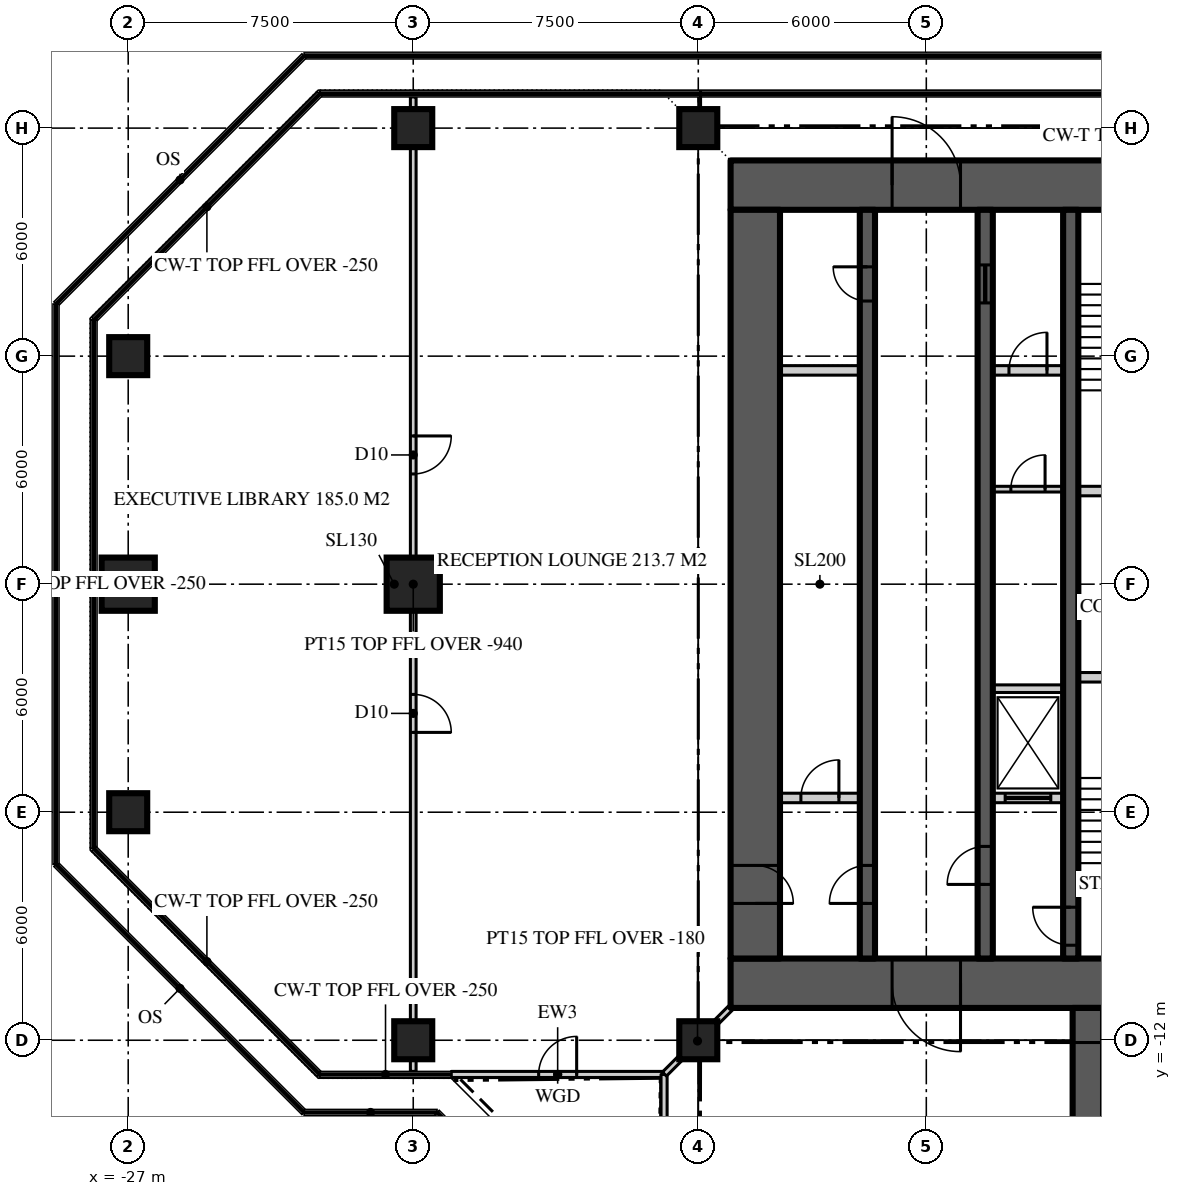
"""IFC4 building model, lengths in metres.
Left out: names, types, materials, properties, quantities, classifications, styles, units other than length and angle.
Written with IfcOpenShell. Run it as: python <this file> out.ifc"""

import sys

from ifc_helpers import new_model, si_unit, direction, frame, frame_2d, origin, origin_2d, place, context, subcontext, project, spatial, rectangle, extrude, element, fill, save


model = new_model("IFC4")
c1 = context("Model", 3, precision=1e-05, world=origin(), true_north=direction((0.0, 1.0)))
c2 = subcontext(c1, "Body", "Model", "MODEL_VIEW")
j1 = project(units=[si_unit("LENGTHUNIT", "METRE"), si_unit("PLANEANGLEUNIT", "RADIAN")], contexts=[c1])
p1 = place(None, origin())
s1 = spatial("IfcSite", under=j1, at=p1, CompositionType="ELEMENT")
p2 = place(p1, origin())
s2 = spatial("IfcBuilding", under=s1, at=p2, CompositionType="ELEMENT")
p3 = place(p2, frame((0.0, 0.0, 302.4)))
s3 = spatial("IfcBuildingStorey", under=s2, at=p3, CompositionType="ELEMENT", Elevation=302.4)
p4 = place(p3, frame((-11.15, 10.5, 0.0), z_axis=(0.0, 0.0, 1.0), x_axis=(1.0, 0.0, 0.0)))
e1 = element("IfcWall", 1, at=p4, inside=s3, PredefinedType="SHEAR", context=c2, shape_type="SweptSolid", body=[
    extrude(rectangle(XDim=22.3, YDim=1.3, at=frame_2d((11.15, 0.0))), origin(), (0.0, 0.0, 1.0), 3.9),
])
p5 = place(p4, frame((4.25, 0.0, 0.0)))
e2 = element("IfcOpeningElement", 2, at=p5, cuts=e1, PredefinedType="OPENING", context=c2, shape_type="SweptSolid", body=[
    extrude(rectangle(XDim=1.8, YDim=2.2, at=frame_2d((0.9, 1.1))), frame((0.0, 0.66, 0.0), z_axis=(0.0, -1.0, 0.0), x_axis=(1.0, 0.0, 0.0)), (0.0, 0.0, 1.0), 1.32),
])
p6 = place(p4, frame((16.25, 0.0, 0.0)))
e3 = element("IfcOpeningElement", 3, at=p6, cuts=e1, PredefinedType="OPENING", context=c2, shape_type="SweptSolid", body=[
    extrude(rectangle(XDim=1.8, YDim=2.2, at=frame_2d((0.9, 1.1))), frame((0.0, 0.66, 0.0), z_axis=(0.0, -1.0, 0.0), x_axis=(1.0, 0.0, 0.0)), (0.0, 0.0, 1.0), 1.32),
])
p7 = place(p3, frame((11.15, -10.5, 0.0), z_axis=(0.0, 0.0, 1.0), x_axis=(-1.0, 0.0, 0.0)))
e4 = element("IfcWall", 4, at=p7, inside=s3, PredefinedType="SHEAR", context=c2, shape_type="SweptSolid", body=[
    extrude(rectangle(XDim=22.3, YDim=1.3, at=frame_2d((11.15, 0.0))), origin(), (0.0, 0.0, 1.0), 3.9),
])
p8 = place(p7, frame((16.25, 0.0, 0.0)))
e5 = element("IfcOpeningElement", 5, at=p8, cuts=e4, PredefinedType="OPENING", context=c2, shape_type="SweptSolid", body=[
    extrude(rectangle(XDim=1.8, YDim=2.2, at=frame_2d((0.9, 1.1))), frame((0.0, 0.66, 0.0), z_axis=(0.0, -1.0, 0.0), x_axis=(1.0, 0.0, 0.0)), (0.0, 0.0, 1.0), 1.32),
])
p9 = place(p7, frame((4.25, 0.0, 0.0)))
e6 = element("IfcOpeningElement", 6, at=p9, cuts=e4, PredefinedType="OPENING", context=c2, shape_type="SweptSolid", body=[
    extrude(rectangle(XDim=1.8, YDim=2.2, at=frame_2d((0.9, 1.1))), frame((0.0, 0.66, 0.0), z_axis=(0.0, -1.0, 0.0), x_axis=(1.0, 0.0, 0.0)), (0.0, 0.0, 1.0), 1.32),
])
p10 = place(p3, frame((-10.5, 9.85, 0.0), z_axis=(0.0, 0.0, 1.0), x_axis=(0.0, -1.0, 0.0)))
e7 = element("IfcWall", 7, at=p10, inside=s3, PredefinedType="SHEAR", context=c2, shape_type="SweptSolid", body=[
    extrude(rectangle(XDim=19.7, YDim=1.3, at=frame_2d((9.85, 0.0))), origin(), (0.0, 0.0, 1.0), 3.9),
])
p11 = place(p10, frame((17.25, 0.0, 0.0)))
e8 = element("IfcOpeningElement", 8, at=p11, cuts=e7, PredefinedType="OPENING", context=c2, shape_type="SweptSolid", body=[
    extrude(rectangle(XDim=1.0, YDim=2.2, at=frame_2d((0.5, 1.1))), frame((0.0, 0.66, 0.0), z_axis=(0.0, -1.0, 0.0), x_axis=(1.0, 0.0, 0.0)), (0.0, 0.0, 1.0), 1.32),
])
p12 = place(p3, frame((-1.75, -11.15, 0.0), z_axis=(0.0, 0.0, 1.0), x_axis=(0.0, -1.0, 0.0)))
e9 = element("IfcWall", 9, at=p12, inside=s3, PredefinedType="SHEAR", context=c2, shape_type="SweptSolid", body=[
    extrude(rectangle(XDim=15.25, YDim=0.8, at=frame_2d((7.625, 0.0))), origin(), (0.0, 0.0, 1.0), 3.9),
])
for number, where, z_axis, x_axis in (
    (10, (-19.5, -12.0, 0.0), (0.0, 0.0, 1.0), (1.0, 0.0, 0.0)),
    (11, (-12.0, -12.0, 0.0), (0.0, 0.0, 1.0), (1.0, 0.0, 0.0)),
    (12, (-27.0, -6.0, 0.0), (0.0, 0.0, 1.0), (1.0, 0.0, 0.0)),
):
    element("IfcColumn", number, at=place(p3, frame(where, z_axis=z_axis, x_axis=x_axis)), inside=s3, PredefinedType="COLUMN", context=c2, shape_type="SweptSolid", body=[
        extrude(rectangle(XDim=1.0, YDim=1.0, at=origin_2d()), origin(), (0.0, 0.0, 1.0), 3.9),
    ])
for number, where, z_axis, x_axis in (
    (13, (-27.0, 0.0, 0.0), (0.0, 0.0, 1.0), (1.0, 0.0, 0.0)),
    (14, (-19.5, 0.0, 0.0), (0.0, 0.0, 1.0), (1.0, 0.0, 0.0)),
):
    element("IfcColumn", number, at=place(p3, frame(where, z_axis=z_axis, x_axis=x_axis)), inside=s3, PredefinedType="COLUMN", context=c2, shape_type="SweptSolid", body=[
        extrude(rectangle(XDim=1.4, YDim=1.4, at=origin_2d()), origin(), (0.0, 0.0, 1.0), 3.9),
    ])
for number, where, z_axis, x_axis in (
    (15, (-27.0, 6.0, 0.0), (0.0, 0.0, 1.0), (1.0, 0.0, 0.0)),
    (16, (-19.5, 12.0, 0.0), (0.0, 0.0, 1.0), (1.0, 0.0, 0.0)),
    (17, (-12.0, 12.0, 0.0), (0.0, 0.0, 1.0), (1.0, 0.0, 0.0)),
):
    element("IfcColumn", number, at=place(p3, frame(where, z_axis=z_axis, x_axis=x_axis)), inside=s3, PredefinedType="COLUMN", context=c2, shape_type="SweptSolid", body=[
        extrude(rectangle(XDim=1.0, YDim=1.0, at=origin_2d()), origin(), (0.0, 0.0, 1.0), 3.9),
    ])
p13 = place(p3, frame((-18.5, -12.9, 0.0), z_axis=(0.0, 0.0, 1.0), x_axis=(1.0, 0.0, 0.0)))
e18 = element("IfcWall", 18, at=p13, inside=s3, PredefinedType="SOLIDWALL", context=c2, shape_type="SweptSolid", body=[
    extrude(rectangle(XDim=5.6, YDim=0.16, at=frame_2d((2.8, 0.0))), origin(), (0.0, 0.0, 1.0), 3.65),
])
p14 = place(p13, frame((2.3, 0.0, 0.0)))
e19 = element("IfcOpeningElement", 19, at=p14, cuts=e18, PredefinedType="OPENING", context=c2, shape_type="SweptSolid", body=[
    extrude(rectangle(XDim=1.0, YDim=2.2, at=frame_2d((0.5, 1.1))), frame((0.0, 0.09, 0.0), z_axis=(0.0, -1.0, 0.0), x_axis=(1.0, 0.0, 0.0)), (0.0, 0.0, 1.0), 0.18),
])
p15 = place(p3, frame((-12.9, -12.9, 0.0), z_axis=(0.0, 0.0, 1.0), x_axis=(0.0, -1.0, 0.0)))
e20 = element("IfcWall", 20, at=p15, inside=s3, PredefinedType="SOLIDWALL", context=c2, shape_type="SweptSolid", body=[
    extrude(rectangle(XDim=5.6, YDim=0.16, at=frame_2d((2.8, 0.0))), origin(), (0.0, 0.0, 1.0), 3.65),
])
p16 = place(p3, frame((-7.55, -9.85, 0.0), z_axis=(0.0, 0.0, 1.0), x_axis=(0.0, 1.0, 0.0)))
e21 = element("IfcWall", 21, at=p16, inside=s3, PredefinedType="SHEAR", context=c2, shape_type="SweptSolid", body=[
    extrude(rectangle(XDim=19.7, YDim=0.4, at=frame_2d((9.85, 0.0))), origin(), (0.0, 0.0, 1.0), 3.9),
])
p17 = place(p16, frame((1.45, 0.0, 0.0)))
e22 = element("IfcOpeningElement", 22, at=p17, cuts=e21, PredefinedType="OPENING", context=c2, shape_type="SweptSolid", body=[
    extrude(rectangle(XDim=1.0, YDim=2.2, at=frame_2d((0.5, 1.1))), frame((0.0, 0.21, 0.0), z_axis=(0.0, -1.0, 0.0), x_axis=(1.0, 0.0, 0.0)), (0.0, 0.0, 1.0), 0.42),
])
p18 = place(p16, frame((17.3, 0.0, 0.0)))
e23 = element("IfcOpeningElement", 23, at=p18, cuts=e21, PredefinedType="OPENING", context=c2, shape_type="SweptSolid", body=[
    extrude(rectangle(XDim=0.9, YDim=2.1, at=frame_2d((0.45, 1.05))), frame((0.0, 0.21, 0.0), z_axis=(0.0, -1.0, 0.0), x_axis=(1.0, 0.0, 0.0)), (0.0, 0.0, 1.0), 0.42),
])
p19 = place(p3, frame((-4.45, -9.85, 0.0), z_axis=(0.0, 0.0, 1.0), x_axis=(0.0, 1.0, 0.0)))
e24 = element("IfcWall", 24, at=p19, inside=s3, PredefinedType="SHEAR", context=c2, shape_type="SweptSolid", body=[
    extrude(rectangle(XDim=19.7, YDim=0.4, at=frame_2d((9.85, 0.0))), origin(), (0.0, 0.0, 1.0), 3.9),
])
p20 = place(p19, frame((1.95, 0.0, 0.0)))
e25 = element("IfcOpeningElement", 25, at=p20, cuts=e24, PredefinedType="OPENING", context=c2, shape_type="SweptSolid", body=[
    extrude(rectangle(XDim=1.0, YDim=2.2, at=frame_2d((0.5, 1.1))), frame((0.0, 0.21, 0.0), z_axis=(0.0, -1.0, 0.0), x_axis=(1.0, 0.0, 0.0)), (0.0, 0.0, 1.0), 0.42),
])
p21 = place(p19, frame((17.25, 0.0, 0.0)))
e26 = element("IfcOpeningElement", 26, at=p21, cuts=e24, PredefinedType="OPENING", context=c2, shape_type="SweptSolid", body=[
    extrude(rectangle(XDim=1.0, YDim=2.1, at=frame_2d((0.5, 1.05))), frame((0.0, 0.21, 0.0), z_axis=(0.0, -1.0, 0.0), x_axis=(1.0, 0.0, 0.0)), (0.0, 0.0, 1.0), 0.42),
])
p22 = place(p3, frame((-2.2, -9.85, 0.0), z_axis=(0.0, 0.0, 1.0), x_axis=(0.0, 1.0, 0.0)))
e27 = element("IfcWall", 27, at=p22, inside=s3, PredefinedType="SHEAR", context=c2, shape_type="SweptSolid", body=[
    extrude(rectangle(XDim=19.7, YDim=0.4, at=frame_2d((9.85, 0.0))), origin(), (0.0, 0.0, 1.0), 3.9),
])
p23 = place(p22, frame((0.35, 0.0, 0.0)))
e28 = element("IfcOpeningElement", 28, at=p23, cuts=e27, PredefinedType="OPENING", context=c2, shape_type="SweptSolid", body=[
    extrude(rectangle(XDim=1.0, YDim=2.2, at=frame_2d((0.5, 1.1))), frame((0.0, 0.21, 0.0), z_axis=(0.0, -1.0, 0.0), x_axis=(1.0, 0.0, 0.0)), (0.0, 0.0, 1.0), 0.42),
])
p24 = place(p3, frame((-9.85, 5.625, 0.0), z_axis=(0.0, 0.0, 1.0), x_axis=(1.0, 0.0, 0.0)))
e29 = element("IfcWall", 29, at=p24, inside=s3, PredefinedType="SOLIDWALL", context=c2, shape_type="SweptSolid", body=[
    extrude(rectangle(XDim=2.1, YDim=0.25, at=frame_2d((1.05, 0.0))), origin(), (0.0, 0.0, 1.0), 3.7),
])
p25 = place(p3, frame((-4.25, 5.625, 0.0), z_axis=(0.0, 0.0, 1.0), x_axis=(1.0, 0.0, 0.0)))
e30 = element("IfcWall", 30, at=p25, inside=s3, PredefinedType="SOLIDWALL", context=c2, shape_type="SweptSolid", body=[
    extrude(rectangle(XDim=1.85, YDim=0.25, at=frame_2d((0.925, 0.0))), origin(), (0.0, 0.0, 1.0), 3.7),
])
p26 = place(p25, frame((0.425, 0.0, 0.0)))
e31 = element("IfcOpeningElement", 31, at=p26, cuts=e30, PredefinedType="OPENING", context=c2, shape_type="SweptSolid", body=[
    extrude(rectangle(XDim=1.0, YDim=2.2, at=frame_2d((0.5, 1.1))), frame((0.0, 0.135, 0.0), z_axis=(0.0, -1.0, 0.0), x_axis=(1.0, 0.0, 0.0)), (0.0, 0.0, 1.0), 0.27),
])
p27 = place(p3, frame((-9.85, -5.625, 0.0), z_axis=(0.0, 0.0, 1.0), x_axis=(1.0, 0.0, 0.0)))
e32 = element("IfcWall", 32, at=p27, inside=s3, PredefinedType="SOLIDWALL", context=c2, shape_type="SweptSolid", body=[
    extrude(rectangle(XDim=2.1, YDim=0.25, at=frame_2d((1.05, 0.0))), origin(), (0.0, 0.0, 1.0), 3.7),
])
p28 = place(p27, frame((0.55, 0.0, 0.0)))
e33 = element("IfcOpeningElement", 33, at=p28, cuts=e32, PredefinedType="OPENING", context=c2, shape_type="SweptSolid", body=[
    extrude(rectangle(XDim=1.0, YDim=2.2, at=frame_2d((0.5, 1.1))), frame((0.0, 0.135, 0.0), z_axis=(0.0, -1.0, 0.0), x_axis=(1.0, 0.0, 0.0)), (0.0, 0.0, 1.0), 0.27),
])
p29 = place(p3, frame((-4.25, -5.625, 0.0), z_axis=(0.0, 0.0, 1.0), x_axis=(1.0, 0.0, 0.0)))
e34 = element("IfcWall", 34, at=p29, inside=s3, PredefinedType="SOLIDWALL", context=c2, shape_type="SweptSolid", body=[
    extrude(rectangle(XDim=1.85, YDim=0.25, at=frame_2d((0.925, 0.0))), origin(), (0.0, 0.0, 1.0), 3.7),
])
p30 = place(p29, frame((0.325, 0.0, 0.0)))
e35 = element("IfcOpeningElement", 35, at=p30, cuts=e34, PredefinedType="OPENING", context=c2, shape_type="SweptSolid", body=[
    extrude(rectangle(XDim=1.2, YDim=2.2, at=frame_2d((0.6, 1.1))), frame((0.0, 0.135, 0.0), z_axis=(0.0, -1.0, 0.0), x_axis=(1.0, 0.0, 0.0)), (0.0, 0.0, 1.0), 0.27),
])
for number, where, z_axis, x_axis in (
    (36, (-2.0, -2.45, 0.0), (0.0, 0.0, 1.0), (1.0, 0.0, 0.0)),
    (37, (-2.0, 2.45, 0.0), (0.0, 0.0, 1.0), (1.0, 0.0, 0.0)),
):
    element("IfcWall", number, at=place(p3, frame(where, z_axis=z_axis, x_axis=x_axis)), inside=s3, PredefinedType="SOLIDWALL", context=c2, shape_type="SweptSolid", body=[
        extrude(rectangle(XDim=4.0, YDim=0.25, at=frame_2d((2.0, 0.0))), origin(), (0.0, 0.0, 1.0), 3.7),
    ])
p31 = place(p3, frame((-4.25, -2.75, 0.0), z_axis=(0.0, 0.0, 1.0), x_axis=(1.0, 0.0, 0.0)))
e38 = element("IfcWall", 38, at=p31, inside=s3, PredefinedType="SOLIDWALL", context=c2, shape_type="SweptSolid", body=[
    extrude(rectangle(XDim=1.85, YDim=0.2, at=frame_2d((0.925, 0.0))), origin(), (0.0, 0.0, 1.0), 3.7),
])
p32 = place(p3, frame((-19.5, 12.82, 0.0), z_axis=(0.0, 0.0, 1.0), x_axis=(0.0, -1.0, 0.0)))
e39 = element("IfcWall", 39, at=p32, inside=s3, PredefinedType="PARTITIONING", context=c2, shape_type="SweptSolid", body=[
    extrude(rectangle(XDim=25.64, YDim=0.15, at=frame_2d((12.82, 0.0))), origin(), (0.0, 0.0, 1.0), 2.96),
])
p33 = place(p32, frame((15.72, 0.0, 0.0)))
e40 = element("IfcOpeningElement", 40, at=p33, cuts=e39, PredefinedType="OPENING", context=c2, shape_type="SweptSolid", body=[
    extrude(rectangle(XDim=1.0, YDim=2.2, at=frame_2d((0.5, 1.1))), frame((0.0, 0.085, 0.0), z_axis=(0.0, -1.0, 0.0), x_axis=(1.0, 0.0, 0.0)), (0.0, 0.0, 1.0), 0.17),
])
p34 = place(p32, frame((8.92, 0.0, 0.0)))
e41 = element("IfcOpeningElement", 41, at=p34, cuts=e39, PredefinedType="OPENING", context=c2, shape_type="SweptSolid", body=[
    extrude(rectangle(XDim=1.0, YDim=2.2, at=frame_2d((0.5, 1.1))), frame((0.0, 0.085, 0.0), z_axis=(0.0, -1.0, 0.0), x_axis=(1.0, 0.0, 0.0)), (0.0, 0.0, 1.0), 0.17),
])
p35 = place(p3, frame((-11.15, -11.15, 0.0), z_axis=(0.0, 0.0, 1.0), x_axis=(-0.707106781187, -0.707106781187, 0.0)))
e42 = element("IfcWall", 42, at=p35, inside=s3, PredefinedType="PARTITIONING", context=c2, shape_type="SweptSolid", body=[
    extrude(rectangle(XDim=2.461, YDim=0.15, at=frame_2d((1.23, 0.0))), origin(), (0.0, 0.0, 1.0), 3.72),
])
p36 = place(p3, frame((-4.25, 2.5, 0.0), z_axis=(0.0, 0.0, 1.0), x_axis=(1.0, 0.0, 0.0)))
e43 = element("IfcWall", 43, at=p36, inside=s3, PredefinedType="SOLIDWALL", context=c2, shape_type="SweptSolid", body=[
    extrude(rectangle(XDim=1.85, YDim=0.15, at=frame_2d((0.925, 0.0))), origin(), (0.0, 0.0, 1.0), 3.72),
])
p37 = place(p36, frame((0.475, 0.0, 0.0)))
e44 = element("IfcOpeningElement", 44, at=p37, cuts=e43, PredefinedType="OPENING", context=c2, shape_type="SweptSolid", body=[
    extrude(rectangle(XDim=0.9, YDim=2.1, at=frame_2d((0.45, 1.05))), frame((0.0, 0.085, 0.0), z_axis=(0.0, -1.0, 0.0), x_axis=(1.0, 0.0, 0.0)), (0.0, 0.0, 1.0), 0.17),
])
p38 = place(p14, origin())
e45 = element("IfcDoor", 45, at=p38, inside=s3, OperationType="SINGLE_SWING_RIGHT", PredefinedType="DOOR", context=c2, shape_type="SweptSolid", body=[
    extrude(rectangle(XDim=1.0, YDim=2.2, at=frame_2d((0.5, 1.1))), frame((0.0, 0.025, 0.0), z_axis=(0.0, -1.0, 0.0), x_axis=(1.0, 0.0, 0.0)), (0.0, 0.0, 1.0), 0.05),
])
fill(e19, e45)
p39 = place(p5, origin())
e46 = element("IfcDoor", 46, at=p39, inside=s3, OperationType="DOUBLE_DOOR_DOUBLE_SWING", PredefinedType="DOOR", context=c2, shape_type="SweptSolid", body=[
    extrude(rectangle(XDim=1.8, YDim=2.2, at=frame_2d((0.9, 1.1))), frame((0.0, 0.025, 0.0), z_axis=(0.0, -1.0, 0.0), x_axis=(1.0, 0.0, 0.0)), (0.0, 0.0, 1.0), 0.05),
])
fill(e2, e46)
p40 = place(p8, origin())
e47 = element("IfcDoor", 47, at=p40, inside=s3, OperationType="DOUBLE_DOOR_DOUBLE_SWING", PredefinedType="DOOR", context=c2, shape_type="SweptSolid", body=[
    extrude(rectangle(XDim=1.8, YDim=2.2, at=frame_2d((0.9, 1.1))), frame((0.0, 0.025, 0.0), z_axis=(0.0, -1.0, 0.0), x_axis=(1.0, 0.0, 0.0)), (0.0, 0.0, 1.0), 0.05),
])
fill(e5, e47)
p41 = place(p17, origin())
e48 = element("IfcDoor", 48, at=p41, inside=s3, OperationType="SINGLE_SWING_LEFT", PredefinedType="DOOR", context=c2, shape_type="SweptSolid", body=[
    extrude(rectangle(XDim=1.0, YDim=2.2, at=frame_2d((0.5, 1.1))), frame((0.0, 0.025, 0.0), z_axis=(0.0, -1.0, 0.0), x_axis=(1.0, 0.0, 0.0)), (0.0, 0.0, 1.0), 0.05),
])
fill(e22, e48)
p42 = place(p11, origin())
e49 = element("IfcDoor", 49, at=p42, inside=s3, OperationType="SINGLE_SWING_RIGHT", PredefinedType="DOOR", context=c2, shape_type="SweptSolid", body=[
    extrude(rectangle(XDim=1.0, YDim=2.2, at=frame_2d((0.5, 1.1))), frame((0.0, 0.025, 0.0), z_axis=(0.0, -1.0, 0.0), x_axis=(1.0, 0.0, 0.0)), (0.0, 0.0, 1.0), 0.05),
])
fill(e8, e49)
p43 = place(p20, origin())
e50 = element("IfcDoor", 50, at=p43, inside=s3, OperationType="SINGLE_SWING_LEFT", PredefinedType="DOOR", context=c2, shape_type="SweptSolid", body=[
    extrude(rectangle(XDim=1.0, YDim=2.2, at=frame_2d((0.5, 1.1))), frame((0.0, 0.025, 0.0), z_axis=(0.0, -1.0, 0.0), x_axis=(1.0, 0.0, 0.0)), (0.0, 0.0, 1.0), 0.05),
])
fill(e25, e50)
p44 = place(p23, origin())
e51 = element("IfcDoor", 51, at=p44, inside=s3, OperationType="SINGLE_SWING_RIGHT", PredefinedType="DOOR", context=c2, shape_type="SweptSolid", body=[
    extrude(rectangle(XDim=1.0, YDim=2.2, at=frame_2d((0.5, 1.1))), frame((0.0, 0.025, 0.0), z_axis=(0.0, -1.0, 0.0), x_axis=(1.0, 0.0, 0.0)), (0.0, 0.0, 1.0), 0.05),
])
fill(e28, e51)
p45 = place(p18, origin())
e52 = element("IfcDoor", 52, at=p45, inside=s3, OperationType="SINGLE_SWING_RIGHT", PredefinedType="DOOR", context=c2, shape_type="SweptSolid", body=[
    extrude(rectangle(XDim=0.9, YDim=2.1, at=frame_2d((0.45, 1.05))), frame((0.0, 0.025, 0.0), z_axis=(0.0, -1.0, 0.0), x_axis=(1.0, 0.0, 0.0)), (0.0, 0.0, 1.0), 0.05),
])
fill(e23, e52)
p46 = place(p21, origin())
e53 = element("IfcDoor", 53, at=p46, inside=s3, OperationType="SLIDING_TO_LEFT", PredefinedType="DOOR", context=c2, shape_type="SweptSolid", body=[
    extrude(rectangle(XDim=1.0, YDim=2.1, at=frame_2d((0.5, 1.05))), frame((0.0, 0.025, 0.0), z_axis=(0.0, -1.0, 0.0), x_axis=(1.0, 0.0, 0.0)), (0.0, 0.0, 1.0), 0.05),
])
fill(e26, e53)
p47 = place(p30, origin())
e54 = element("IfcDoor", 54, at=p47, inside=s3, OperationType="SLIDING_TO_LEFT", PredefinedType="DOOR", context=c2, shape_type="SweptSolid", body=[
    extrude(rectangle(XDim=1.2, YDim=2.2, at=frame_2d((0.6, 1.1))), frame((0.0, 0.025, 0.0), z_axis=(0.0, -1.0, 0.0), x_axis=(1.0, 0.0, 0.0)), (0.0, 0.0, 1.0), 0.05),
])
fill(e35, e54)
p48 = place(p33, origin())
e55 = element("IfcDoor", 55, at=p48, inside=s3, OperationType="SINGLE_SWING_RIGHT", PredefinedType="DOOR", context=c2, shape_type="SweptSolid", body=[
    extrude(rectangle(XDim=1.0, YDim=2.2, at=frame_2d((0.5, 1.1))), frame((0.0, 0.025, 0.0), z_axis=(0.0, -1.0, 0.0), x_axis=(1.0, 0.0, 0.0)), (0.0, 0.0, 1.0), 0.05),
])
fill(e40, e55)
p49 = place(p34, origin())
e56 = element("IfcDoor", 56, at=p49, inside=s3, OperationType="SINGLE_SWING_LEFT", PredefinedType="DOOR", context=c2, shape_type="SweptSolid", body=[
    extrude(rectangle(XDim=1.0, YDim=2.2, at=frame_2d((0.5, 1.1))), frame((0.0, 0.025, 0.0), z_axis=(0.0, -1.0, 0.0), x_axis=(1.0, 0.0, 0.0)), (0.0, 0.0, 1.0), 0.05),
])
fill(e41, e56)
p50 = place(p28, origin())
e57 = element("IfcDoor", 57, at=p50, inside=s3, OperationType="SINGLE_SWING_RIGHT", PredefinedType="DOOR", context=c2, shape_type="SweptSolid", body=[
    extrude(rectangle(XDim=1.0, YDim=2.2, at=frame_2d((0.5, 1.1))), frame((0.0, 0.025, 0.0), z_axis=(0.0, -1.0, 0.0), x_axis=(1.0, 0.0, 0.0)), (0.0, 0.0, 1.0), 0.05),
])
fill(e33, e57)
p51 = place(p37, origin())
e58 = element("IfcDoor", 58, at=p51, inside=s3, OperationType="SINGLE_SWING_RIGHT", PredefinedType="DOOR", context=c2, shape_type="SweptSolid", body=[
    extrude(rectangle(XDim=0.9, YDim=2.1, at=frame_2d((0.45, 1.05))), frame((0.0, 0.025, 0.0), z_axis=(0.0, -1.0, 0.0), x_axis=(1.0, 0.0, 0.0)), (0.0, 0.0, 1.0), 0.05),
])
fill(e44, e58)
p52 = place(p26, origin())
e59 = element("IfcDoor", 59, at=p52, inside=s3, OperationType="SINGLE_SWING_RIGHT", PredefinedType="DOOR", context=c2, shape_type="SweptSolid", body=[
    extrude(rectangle(XDim=1.0, YDim=2.2, at=frame_2d((0.5, 1.1))), frame((0.0, 0.025, 0.0), z_axis=(0.0, -1.0, 0.0), x_axis=(1.0, 0.0, 0.0)), (0.0, 0.0, 1.0), 0.05),
])
fill(e31, e59)
save(model, sys.argv[1])
